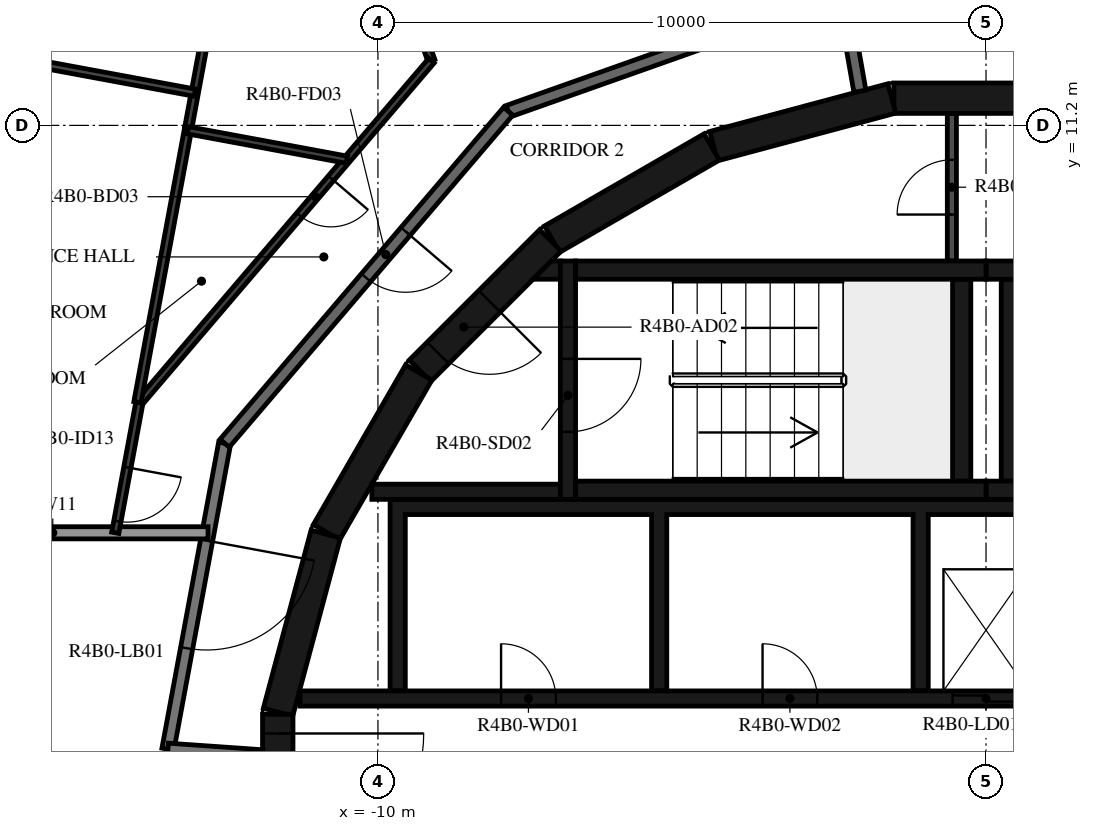
"""IFC4 building model, lengths in metres.
Left out: names, types, materials, properties, quantities, classifications, styles, units other than length and angle.
Written with IfcOpenShell. Run it as: python <this file> out.ifc"""

import sys

from ifc_helpers import new_model, si_unit, direction, frame, frame_2d, origin, place, context, subcontext, project, spatial, polyline, rectangle, outline, extrude, element, fill, save


model = new_model("IFC4")
c1 = context("Model", 3, precision=1e-05, world=origin(), true_north=direction((0.0, 1.0)))
c2 = subcontext(c1, "Body", "Model", "MODEL_VIEW")
j1 = project(units=[si_unit("LENGTHUNIT", "METRE"), si_unit("PLANEANGLEUNIT", "RADIAN")], contexts=[c1])
p1 = place(None, origin())
s1 = spatial("IfcSite", under=j1, at=p1, CompositionType="ELEMENT")
p2 = place(p1, origin())
s2 = spatial("IfcBuilding", under=s1, at=p2, CompositionType="ELEMENT")
p3 = place(p2, frame((0.0, 0.0, 165.7)))
s3 = spatial("IfcBuildingStorey", under=s2, at=p3, CompositionType="ELEMENT", Elevation=165.7)
for number, where, z_axis, x_axis in (
    (1, (1.516, 11.647, 0.0), (0.0, 0.0, 1.0), (-1.0, 0.0, 0.0)),
    (2, (-1.55, 11.643, 0.0), (0.0, 0.0, 1.0), (-0.966, -0.259, 0.0)),
    (3, (-4.51, 10.845, 0.0), (0.0, 0.0, 1.0), (-0.866, -0.5, 0.0)),
):
    element("IfcWall", number, at=place(p3, frame(where, z_axis=z_axis, x_axis=x_axis)), inside=s3, PredefinedType="SHEAR", context=c2, shape_type="SweptSolid", body=[
        extrude(rectangle(XDim=3.033, YDim=0.5, at=frame_2d((1.516, 0.0))), origin(), (0.0, 0.0, 1.0), 3.12),
    ])
p4 = place(p3, frame((-7.164, 9.308, 0.0), z_axis=(0.0, 0.0, 1.0), x_axis=(-0.707106781187, -0.707106781187, 0.0)))
e4 = element("IfcWall", 4, at=p4, inside=s3, PredefinedType="SHEAR", context=c2, shape_type="SweptSolid", body=[
    extrude(rectangle(XDim=3.032, YDim=0.5, at=frame_2d((1.516, 0.0))), origin(), (0.0, 0.0, 1.0), 3.12),
])
p5 = place(p4, frame((1.416, 0.0, 0.0)))
e5 = element("IfcOpeningElement", 5, at=p5, cuts=e4, PredefinedType="OPENING", context=c2, shape_type="SweptSolid", body=[
    extrude(rectangle(XDim=1.2, YDim=2.1, at=frame_2d((0.6, 1.05))), frame((0.0, 0.26, 0.0), z_axis=(0.0, -1.0, 0.0), x_axis=(1.0, 0.0, 0.0)), (0.0, 0.0, 1.0), 0.52),
])
for number, where, z_axis, x_axis in (
    (6, (-9.329, 7.137, 0.0), (0.0, 0.0, 1.0), (-0.5, -0.866, 0.0)),
    (7, (-10.858, 4.479, 0.0), (0.0, 0.0, 1.0), (-0.259, -0.966, 0.0)),
):
    element("IfcWall", number, at=place(p3, frame(where, z_axis=z_axis, x_axis=x_axis)), inside=s3, PredefinedType="SHEAR", context=c2, shape_type="SweptSolid", body=[
        extrude(rectangle(XDim=3.033, YDim=0.5, at=frame_2d((1.516, 0.0))), origin(), (0.0, 0.0, 1.0), 3.12),
    ])
p6 = place(p3, frame((-11.647, 1.516, 0.0), z_axis=(0.0, 0.0, 1.0), x_axis=(0.0, -1.0, 0.0)))
e8 = element("IfcWall", 8, at=p6, inside=s3, PredefinedType="SHEAR", context=c2, shape_type="SweptSolid", body=[
    extrude(rectangle(XDim=3.033, YDim=0.5, at=frame_2d((1.516, 0.0))), origin(), (0.0, 0.0, 1.0), 3.12),
])
p7 = place(p6, frame((0.316, 0.0, 0.0)))
e9 = element("IfcOpeningElement", 9, at=p7, cuts=e8, PredefinedType="OPENING", context=c2, shape_type="SweptSolid", body=[
    extrude(rectangle(XDim=2.4, YDim=2.1, at=frame_2d((1.2, 1.05))), frame((0.0, 0.26, 0.0), z_axis=(0.0, -1.0, 0.0), x_axis=(1.0, 0.0, 0.0)), (0.0, 0.0, 1.0), 0.52),
])
for number, where, z_axis, x_axis in (
    (10, (0.0, 5.2, 0.0), (0.0, 0.0, 1.0), (1.0, 0.0, 0.0)),
    (11, (0.0, 8.82, 0.0), (0.0, 0.0, 1.0), (1.0, 0.0, 0.0)),
):
    element("IfcWall", number, at=place(p3, frame(where, z_axis=z_axis, x_axis=x_axis)), inside=s3, PredefinedType="SHEAR", context=c2, shape_type="SweptSolid", body=[
        extrude(rectangle(XDim=6.75, YDim=0.3, at=frame_2d((3.375, 0.0))), origin(), (0.0, 0.0, 1.0), 3.12),
    ])
p8 = place(p3, frame((0.4, 5.35, 0.0), z_axis=(0.0, 0.0, 1.0), x_axis=(0.0, 1.0, 0.0)))
e12 = element("IfcWall", 12, at=p8, inside=s3, PredefinedType="SHEAR", context=c2, shape_type="SweptSolid", body=[
    extrude(rectangle(XDim=3.32, YDim=0.3, at=frame_2d((1.66, 0.0))), origin(), (0.0, 0.0, 1.0), 3.12),
])
for number, where, z_axis, x_axis in (
    (13, (-6.75, 5.2, 0.0), (0.0, 0.0, 1.0), (1.0, 0.0, 0.0)),
    (14, (-6.75, 8.82, 0.0), (0.0, 0.0, 1.0), (1.0, 0.0, 0.0)),
):
    element("IfcWall", number, at=place(p3, frame(where, z_axis=z_axis, x_axis=x_axis)), inside=s3, PredefinedType="SHEAR", context=c2, shape_type="SweptSolid", body=[
        extrude(rectangle(XDim=6.75, YDim=0.3, at=frame_2d((3.375, 0.0))), origin(), (0.0, 0.0, 1.0), 3.12),
    ])
p9 = place(p3, frame((-0.4, 5.35, 0.0), z_axis=(0.0, 0.0, 1.0), x_axis=(0.0, 1.0, 0.0)))
e15 = element("IfcWall", 15, at=p9, inside=s3, PredefinedType="SHEAR", context=c2, shape_type="SweptSolid", body=[
    extrude(rectangle(XDim=3.32, YDim=0.3, at=frame_2d((1.66, 0.0))), origin(), (0.0, 0.0, 1.0), 3.12),
])
p10 = place(p3, frame((-6.875, 8.97, 0.0), z_axis=(0.0, 0.0, 1.0), x_axis=(0.0, -1.0, 0.0)))
e16 = element("IfcWall", 16, at=p10, inside=s3, PredefinedType="SHEAR", context=c2, shape_type="SweptSolid", body=[
    extrude(rectangle(XDim=3.92, YDim=0.25, at=frame_2d((1.96, 0.0))), origin(), (0.0, 0.0, 1.0), 3.12),
])
p11 = place(p10, frame((1.61, 0.0, 0.0)))
e17 = element("IfcOpeningElement", 17, at=p11, cuts=e16, PredefinedType="OPENING", context=c2, shape_type="SweptSolid", body=[
    extrude(rectangle(XDim=1.2, YDim=2.1, at=frame_2d((0.6, 1.05))), frame((0.0, 0.135, 0.0), z_axis=(0.0, -1.0, 0.0), x_axis=(1.0, 0.0, 0.0)), (0.0, 0.0, 1.0), 0.27),
])
p12 = place(p3, frame((-7.0, 5.175, 0.0), z_axis=(0.0, 0.0, 1.0), x_axis=(-1.0, 0.0, 0.0)))
e18 = element("IfcWall", 18, at=p12, inside=s3, PredefinedType="SHEAR", context=c2, shape_type="SweptSolid", body=[
    extrude(rectangle(XDim=3.1, YDim=0.25, at=frame_2d((1.55, 0.0))), origin(), (0.0, 0.0, 1.0), 3.12),
])
p13 = place(p3, origin())
e19 = element("IfcWall", 19, at=p13, inside=s3, PredefinedType="SHEAR", context=c2, shape_type="SweptSolid", body=[
    extrude(outline(polyline([(-7.148, 8.97), (-7.0, 8.97), (-7.0, 8.67), (-7.448, 8.67), (-7.148, 8.97)])), origin(), (0.0, 0.0, 1.0), 3.12),
])
p14 = place(p3, origin())
e20 = element("IfcWall", 20, at=p14, inside=s3, PredefinedType="SHEAR", context=c2, shape_type="SweptSolid", body=[
    extrude(outline(polyline([(-9.55, 4.8), (-5.5, 4.8), (-5.5, 1.9), (-5.25, 1.9), (-5.25, 4.8), (-1.2, 4.8), (-1.2, 1.9), (-0.95, 1.9), (-0.95, 4.8), (0.95, 4.8), (0.95, 1.9), (1.2, 1.9), (1.2, 4.8), (3.1, 4.8), (3.1, 1.9), (3.35, 1.9), (3.35, 4.8), (5.25, 4.8), (5.25, 1.9), (5.5, 1.9), (5.5, 4.8), (7.4, 4.8), (7.4, 1.9), (7.65, 1.9), (7.65, 4.8), (9.55, 4.8), (9.55, 1.9), (9.8, 1.9), (9.8, 4.8), (9.8, 5.05), (-9.8, 5.05), (-9.8, 4.8), (-9.8, 1.9), (-9.55, 1.9), (-9.55, 4.8)])), origin(), (0.0, 0.0, 1.0), 3.12),
])
p15 = place(p3, frame((-11.28, 1.775, 0.0), z_axis=(0.0, 0.0, 1.0), x_axis=(1.0, 0.0, 0.0)))
e21 = element("IfcWall", 21, at=p15, inside=s3, PredefinedType="SHEAR", context=c2, shape_type="SweptSolid", body=[
    extrude(rectangle(XDim=14.38, YDim=0.25, at=frame_2d((7.19, 0.0))), origin(), (0.0, 0.0, 1.0), 3.12),
])
p16 = place(p15, frame((10.73, 0.0, 0.0)))
e22 = element("IfcOpeningElement", 22, at=p16, cuts=e21, PredefinedType="OPENING", context=c2, shape_type="SweptSolid", body=[
    extrude(rectangle(XDim=1.1, YDim=2.1, at=frame_2d((0.55, 1.05))), frame((0.0, 0.135, 0.0), z_axis=(0.0, -1.0, 0.0), x_axis=(1.0, 0.0, 0.0)), (0.0, 0.0, 1.0), 0.27),
])
p17 = place(p15, frame((12.88, 0.0, 0.0)))
e23 = element("IfcOpeningElement", 23, at=p17, cuts=e21, PredefinedType="OPENING", context=c2, shape_type="SweptSolid", body=[
    extrude(rectangle(XDim=1.1, YDim=2.1, at=frame_2d((0.55, 1.05))), frame((0.0, 0.135, 0.0), z_axis=(0.0, -1.0, 0.0), x_axis=(1.0, 0.0, 0.0)), (0.0, 0.0, 1.0), 0.27),
])
p18 = place(p15, frame((3.305, 0.0, 0.0)))
e24 = element("IfcOpeningElement", 24, at=p18, cuts=e21, PredefinedType="OPENING", context=c2, shape_type="SweptSolid", body=[
    extrude(rectangle(XDim=0.9, YDim=2.1, at=frame_2d((0.45, 1.05))), frame((0.0, 0.135, 0.0), z_axis=(0.0, -1.0, 0.0), x_axis=(1.0, 0.0, 0.0)), (0.0, 0.0, 1.0), 0.27),
])
p19 = place(p15, frame((7.605, 0.0, 0.0)))
e25 = element("IfcOpeningElement", 25, at=p19, cuts=e21, PredefinedType="OPENING", context=c2, shape_type="SweptSolid", body=[
    extrude(rectangle(XDim=0.9, YDim=2.1, at=frame_2d((0.45, 1.05))), frame((0.0, 0.135, 0.0), z_axis=(0.0, -1.0, 0.0), x_axis=(1.0, 0.0, 0.0)), (0.0, 0.0, 1.0), 0.27),
])
p20 = place(p3, frame((-0.562, 8.97, 0.0), z_axis=(0.0, 0.0, 1.0), x_axis=(0.0, 1.0, 0.0)))
e26 = element("IfcWall", 26, at=p20, inside=s3, PredefinedType="PARTITIONING", context=c2, shape_type="SweptSolid", body=[
    extrude(rectangle(XDim=2.427, YDim=0.15, at=frame_2d((1.214, 0.0))), origin(), (0.0, 0.0, 1.0), 3.12),
])
p21 = place(p20, frame((0.764, 0.0, 0.0)))
e27 = element("IfcOpeningElement", 27, at=p21, cuts=e26, PredefinedType="OPENING", context=c2, shape_type="SweptSolid", body=[
    extrude(rectangle(XDim=0.9, YDim=2.1, at=frame_2d((0.45, 1.05))), frame((0.0, 0.085, 0.0), z_axis=(0.0, -1.0, 0.0), x_axis=(1.0, 0.0, 0.0)), (0.0, 0.0, 1.0), 0.17),
])
p22 = place(p3, frame((-12.521, 5.972, 0.0), z_axis=(0.0, 0.0, 1.0), x_axis=(-0.182251559718, -0.983251935661, 0.0)))
e28 = element("IfcWall", 28, at=p22, inside=s3, PredefinedType="STANDARD", context=c2, shape_type="SweptSolid", body=[
    extrude(rectangle(XDim=5.117, YDim=0.2, at=frame_2d((2.559, 0.0))), origin(), (0.0, 0.0, 1.0), 3.12),
])
p23 = place(p22, frame((1.627, 0.0, 0.0)))
e29 = element("IfcOpeningElement", 29, at=p23, cuts=e28, PredefinedType="OPENING", context=c2, shape_type="SweptSolid", body=[
    extrude(rectangle(XDim=1.8, YDim=2.1, at=frame_2d((0.9, 1.05))), frame((0.0, 0.11, 0.0), z_axis=(0.0, -1.0, 0.0), x_axis=(1.0, 0.0, 0.0)), (0.0, 0.0, 1.0), 0.22),
])
p24 = place(p3, frame((-13.454, 0.941, 0.0), z_axis=(0.0, 0.0, 1.0), x_axis=(0.99755155062, -0.069934997354, 0.0)))
e30 = element("IfcWall", 30, at=p24, inside=s3, PredefinedType="STANDARD", context=c2, shape_type="SweptSolid", body=[
    extrude(rectangle(XDim=1.561, YDim=0.2, at=frame_2d((0.78, 0.0))), origin(), (0.0, 0.0, 1.0), 3.12),
])
p25 = place(p3, frame((-2.074, 11.761, 0.0), z_axis=(0.0, 0.0, 1.0), x_axis=(-0.1736412798, 0.984808969267, 0.0)))
e31 = element("IfcWall", 31, at=p25, inside=s3, PredefinedType="STANDARD", context=c2, shape_type="SweptSolid", body=[
    extrude(rectangle(XDim=1.644, YDim=0.2, at=frame_2d((0.822, 0.0))), origin(), (0.0, 0.0, 1.0), 3.12),
])
p26 = place(p3, frame((-2.359, 13.38, 0.0), z_axis=(0.0, 0.0, 1.0), x_axis=(-0.942647529236, -0.333789807551, 0.0)))
e32 = element("IfcWall", 32, at=p26, inside=s3, PredefinedType="STANDARD", context=c2, shape_type="SweptSolid", body=[
    extrude(rectangle(XDim=5.833, YDim=0.2, at=frame_2d((2.917, 0.0))), origin(), (0.0, 0.0, 1.0), 3.12),
])
p27 = place(p3, frame((-7.858, 11.433, 0.0), z_axis=(0.0, 0.0, 1.0), x_axis=(-0.649440801937, -0.760412154545, 0.0)))
e33 = element("IfcWall", 33, at=p27, inside=s3, PredefinedType="STANDARD", context=c2, shape_type="SweptSolid", body=[
    extrude(rectangle(XDim=7.181, YDim=0.2, at=frame_2d((3.59, 0.0))), origin(), (0.0, 0.0, 1.0), 3.12),
])
p28 = place(p27, frame((2.6, 0.0, 0.0)))
e34 = element("IfcOpeningElement", 34, at=p28, cuts=e33, PredefinedType="OPENING", context=c2, shape_type="SweptSolid", body=[
    extrude(rectangle(XDim=1.0, YDim=2.1, at=frame_2d((0.5, 1.05))), frame((0.0, 0.11, 0.0), z_axis=(0.0, -1.0, 0.0), x_axis=(1.0, 0.0, 0.0)), (0.0, 0.0, 1.0), 0.22),
])
p29 = place(p3, frame((-12.794, 4.5, 0.0), z_axis=(0.0, 0.0, 1.0), x_axis=(-1.0, 0.0, 0.0)))
e35 = element("IfcWall", 35, at=p29, inside=s3, PredefinedType="STANDARD", context=c2, shape_type="SweptSolid", body=[
    extrude(rectangle(XDim=5.106, YDim=0.2, at=frame_2d((2.553, 0.0))), origin(), (0.0, 0.0, 1.0), 2.73),
])
p30 = place(p3, frame((-10.402, 15.882, 0.0), z_axis=(0.0, 0.0, 1.0), x_axis=(0.33382476952, -0.942635148536, 0.0)))
e36 = element("IfcWall", 36, at=p30, inside=s3, PredefinedType="PARTITIONING", context=c2, shape_type="SweptSolid", body=[
    extrude(rectangle(XDim=3.838, YDim=0.12, at=frame_2d((1.919, 0.0))), origin(), (0.0, 0.0, 1.0), 3.12),
])
p31 = place(p3, frame((-9.12, 12.264, 0.0), z_axis=(0.0, 0.0, 1.0), x_axis=(-0.649444490942, -0.760409003882, 0.0)))
e37 = element("IfcWall", 37, at=p31, inside=s3, PredefinedType="PARTITIONING", context=c2, shape_type="SweptSolid", body=[
    extrude(rectangle(XDim=7.395, YDim=0.12, at=frame_2d((3.697, 0.0))), origin(), (0.0, 0.0, 1.0), 3.12),
])
p32 = place(p31, frame((2.542, 0.0, 0.0)))
e38 = element("IfcOpeningElement", 38, at=p32, cuts=e37, PredefinedType="OPENING", context=c2, shape_type="SweptSolid", body=[
    extrude(rectangle(XDim=0.8, YDim=2.1, at=frame_2d((0.4, 1.05))), frame((0.0, 0.07, 0.0), z_axis=(0.0, -1.0, 0.0), x_axis=(1.0, 0.0, 0.0)), (0.0, 0.0, 1.0), 0.14),
])
p33 = place(p3, frame((-13.923, 6.641, 0.0), z_axis=(0.0, 0.0, 1.0), x_axis=(-0.182209715759, -0.983259690765, 0.0)))
e39 = element("IfcWall", 39, at=p33, inside=s3, PredefinedType="PARTITIONING", context=c2, shape_type="SweptSolid", body=[
    extrude(rectangle(XDim=2.177, YDim=0.12, at=frame_2d((1.089, 0.0))), origin(), (0.0, 0.0, 1.0), 3.12),
])
p34 = place(p33, frame((1.083, 0.0, 0.0)))
e40 = element("IfcOpeningElement", 40, at=p34, cuts=e39, PredefinedType="OPENING", context=c2, shape_type="SweptSolid", body=[
    extrude(rectangle(XDim=0.9, YDim=2.1, at=frame_2d((0.45, 1.05))), frame((0.0, 0.07, 0.0), z_axis=(0.0, -1.0, 0.0), x_axis=(1.0, 0.0, 0.0)), (0.0, 0.0, 1.0), 0.14),
])
p35 = place(p3, frame((-13.955, 6.647, 0.0), z_axis=(0.0, 0.0, 1.0), x_axis=(0.182264522222, 0.983249532896, 0.0)))
e41 = element("IfcWall", 41, at=p35, inside=s3, PredefinedType="PARTITIONING", context=c2, shape_type="SweptSolid", body=[
    extrude(rectangle(XDim=4.589, YDim=0.12, at=frame_2d((2.294, 0.0))), origin(), (0.0, 0.0, 1.0), 3.12),
])
p36 = place(p3, frame((-11.396, 20.453, 0.0), z_axis=(0.0, 0.0, 1.0), x_axis=(-0.182223370439, -0.983257160292, 0.0)))
e42 = element("IfcWall", 42, at=p36, inside=s3, PredefinedType="PARTITIONING", context=c2, shape_type="SweptSolid", body=[
    extrude(rectangle(XDim=9.452, YDim=0.12, at=frame_2d((4.726, 0.0))), origin(), (0.0, 0.0, 1.0), 3.12),
])
p37 = place(p36, frame((3.406, 0.0, 0.0)))
e43 = element("IfcOpeningElement", 43, at=p37, cuts=e42, PredefinedType="OPENING", context=c2, shape_type="SweptSolid", body=[
    extrude(rectangle(XDim=0.9, YDim=2.1, at=frame_2d((0.45, 1.05))), frame((0.0, 0.07, 0.0), z_axis=(0.0, -1.0, 0.0), x_axis=(1.0, 0.0, 0.0)), (0.0, 0.0, 1.0), 0.14),
])
p38 = place(p36, frame((0.2, 0.0, 0.0)))
e44 = element("IfcOpeningElement", 44, at=p38, cuts=e42, PredefinedType="OPENING", context=c2, shape_type="SweptSolid", body=[
    extrude(rectangle(XDim=0.9, YDim=2.1, at=frame_2d((0.45, 1.05))), frame((0.0, 0.07, 0.0), z_axis=(0.0, -1.0, 0.0), x_axis=(1.0, 0.0, 0.0)), (0.0, 0.0, 1.0), 0.14),
])
p39 = place(p3, frame((-13.126, 11.12, 0.0), z_axis=(0.0, 0.0, 1.0), x_axis=(0.983257646361, -0.182220747645, 0.0)))
e45 = element("IfcWall", 45, at=p39, inside=s3, PredefinedType="PARTITIONING", context=c2, shape_type="SweptSolid", body=[
    extrude(rectangle(XDim=2.659, YDim=0.12, at=frame_2d((1.33, 0.0))), origin(), (0.0, 0.0, 1.0), 3.12),
])
p40 = place(p3, frame((-16.552, 12.394, 0.0), z_axis=(0.0, 0.0, 1.0), x_axis=(0.983257712156, -0.182220392618, 0.0)))
e46 = element("IfcWall", 46, at=p40, inside=s3, PredefinedType="PARTITIONING", context=c2, shape_type="SweptSolid", body=[
    extrude(rectangle(XDim=3.6, YDim=0.12, at=frame_2d((1.8, 0.0))), origin(), (0.0, 0.0, 1.0), 2.73),
])
p41 = place(p11, origin())
e47 = element("IfcDoor", 47, at=p41, inside=s3, OperationType="SINGLE_SWING_LEFT", PredefinedType="DOOR", context=c2, shape_type="SweptSolid", body=[
    extrude(rectangle(XDim=1.2, YDim=2.1, at=frame_2d((0.6, 1.05))), frame((0.0, 0.025, 0.0), z_axis=(0.0, -1.0, 0.0), x_axis=(1.0, 0.0, 0.0)), (0.0, 0.0, 1.0), 0.05),
])
fill(e17, e47)
p42 = place(p5, origin())
e48 = element("IfcDoor", 48, at=p42, inside=s3, OperationType="SINGLE_SWING_RIGHT", PredefinedType="DOOR", context=c2, shape_type="SweptSolid", body=[
    extrude(rectangle(XDim=1.2, YDim=2.1, at=frame_2d((0.6, 1.05))), frame((0.0, 0.025, 0.0), z_axis=(0.0, -1.0, 0.0), x_axis=(1.0, 0.0, 0.0)), (0.0, 0.0, 1.0), 0.05),
])
fill(e5, e48)
p43 = place(p7, origin())
e49 = element("IfcDoor", 49, at=p43, inside=s3, OperationType="DOUBLE_DOOR_SINGLE_SWING", PredefinedType="DOOR", context=c2, shape_type="SweptSolid", body=[
    extrude(rectangle(XDim=2.4, YDim=2.1, at=frame_2d((1.2, 1.05))), frame((0.0, 0.025, 0.0), z_axis=(0.0, -1.0, 0.0), x_axis=(1.0, 0.0, 0.0)), (0.0, 0.0, 1.0), 0.05),
])
fill(e9, e49)
p44 = place(p16, origin())
e50 = element("IfcDoor", 50, at=p44, inside=s3, OperationType="DOUBLE_DOOR_SLIDING", PredefinedType="DOOR", context=c2, shape_type="SweptSolid", body=[
    extrude(rectangle(XDim=1.1, YDim=2.1, at=frame_2d((0.55, 1.05))), frame((0.0, 0.025, 0.0), z_axis=(0.0, -1.0, 0.0), x_axis=(1.0, 0.0, 0.0)), (0.0, 0.0, 1.0), 0.05),
])
fill(e22, e50)
p45 = place(p18, origin())
e51 = element("IfcDoor", 51, at=p45, inside=s3, OperationType="SINGLE_SWING_LEFT", PredefinedType="DOOR", context=c2, shape_type="SweptSolid", body=[
    extrude(rectangle(XDim=0.9, YDim=2.1, at=frame_2d((0.45, 1.05))), frame((0.0, 0.025, 0.0), z_axis=(0.0, -1.0, 0.0), x_axis=(1.0, 0.0, 0.0)), (0.0, 0.0, 1.0), 0.05),
])
fill(e24, e51)
p46 = place(p19, origin())
e52 = element("IfcDoor", 52, at=p46, inside=s3, OperationType="SINGLE_SWING_RIGHT", PredefinedType="DOOR", context=c2, shape_type="SweptSolid", body=[
    extrude(rectangle(XDim=0.9, YDim=2.1, at=frame_2d((0.45, 1.05))), frame((0.0, 0.025, 0.0), z_axis=(0.0, -1.0, 0.0), x_axis=(1.0, 0.0, 0.0)), (0.0, 0.0, 1.0), 0.05),
])
fill(e25, e52)
p47 = place(p21, origin())
e53 = element("IfcDoor", 53, at=p47, inside=s3, OperationType="SINGLE_SWING_LEFT", PredefinedType="DOOR", context=c2, shape_type="SweptSolid", body=[
    extrude(rectangle(XDim=0.9, YDim=2.1, at=frame_2d((0.45, 1.05))), frame((0.0, 0.025, 0.0), z_axis=(0.0, -1.0, 0.0), x_axis=(1.0, 0.0, 0.0)), (0.0, 0.0, 1.0), 0.05),
])
fill(e27, e53)
p48 = place(p28, origin())
e54 = element("IfcDoor", 54, at=p48, inside=s3, OperationType="SINGLE_SWING_LEFT", PredefinedType="DOOR", context=c2, shape_type="SweptSolid", body=[
    extrude(rectangle(XDim=1.0, YDim=2.1, at=frame_2d((0.5, 1.05))), frame((0.0, 0.025, 0.0), z_axis=(0.0, -1.0, 0.0), x_axis=(1.0, 0.0, 0.0)), (0.0, 0.0, 1.0), 0.05),
])
fill(e34, e54)
p49 = place(p32, origin())
e55 = element("IfcDoor", 55, at=p49, inside=s3, OperationType="SINGLE_SWING_LEFT", PredefinedType="DOOR", context=c2, shape_type="SweptSolid", body=[
    extrude(rectangle(XDim=0.8, YDim=2.1, at=frame_2d((0.4, 1.05))), frame((0.0, 0.025, 0.0), z_axis=(0.0, -1.0, 0.0), x_axis=(1.0, 0.0, 0.0)), (0.0, 0.0, 1.0), 0.05),
])
fill(e38, e55)
p50 = place(p34, origin())
e56 = element("IfcDoor", 56, at=p50, inside=s3, OperationType="SINGLE_SWING_LEFT", PredefinedType="DOOR", context=c2, shape_type="SweptSolid", body=[
    extrude(rectangle(XDim=0.9, YDim=2.1, at=frame_2d((0.45, 1.05))), frame((0.0, 0.025, 0.0), z_axis=(0.0, -1.0, 0.0), x_axis=(1.0, 0.0, 0.0)), (0.0, 0.0, 1.0), 0.05),
])
fill(e40, e56)
p51 = place(p23, origin())
e57 = element("IfcDoor", 57, at=p51, inside=s3, OperationType="DOUBLE_DOOR_SINGLE_SWING", PredefinedType="DOOR", context=c2, shape_type="SweptSolid", body=[
    extrude(rectangle(XDim=1.8, YDim=2.1, at=frame_2d((0.9, 1.05))), frame((0.0, 0.025, 0.0), z_axis=(0.0, -1.0, 0.0), x_axis=(1.0, 0.0, 0.0)), (0.0, 0.0, 1.0), 0.05),
])
fill(e29, e57)
save(model, sys.argv[1])
